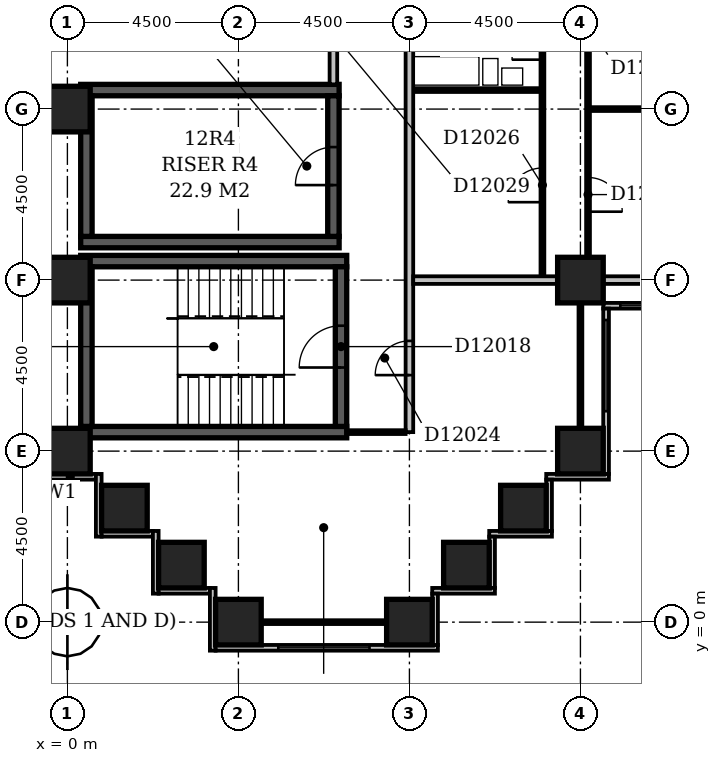
"""IFC4 building model, lengths in metres.
Left out: names, types, materials, properties, quantities, classifications, styles, units other than length and angle.
Written with IfcOpenShell. Run it as: python <this file> out.ifc"""

import sys

from ifc_helpers import new_model, si_unit, direction, frame, frame_2d, origin, origin_2d, place, context, subcontext, project, spatial, rectangle, extrude, element, fill, save


model = new_model("IFC4")
c1 = context("Model", 3, precision=1e-05, world=origin(), true_north=direction((0.0, 1.0)))
c2 = subcontext(c1, "Body", "Model", "MODEL_VIEW")
j1 = project(units=[si_unit("LENGTHUNIT", "METRE"), si_unit("PLANEANGLEUNIT", "RADIAN")], contexts=[c1])
p1 = place(None, origin())
s1 = spatial("IfcSite", under=j1, at=p1, CompositionType="ELEMENT")
p2 = place(p1, origin())
s2 = spatial("IfcBuilding", under=s1, at=p2, CompositionType="ELEMENT")
p3 = place(p2, frame((0.0, 0.0, 54.2)))
s3 = spatial("IfcBuildingStorey", under=s2, at=p3, CompositionType="ELEMENT", Elevation=54.2)
for number, where, z_axis, x_axis in (
    (1, (0.35, 5.0, -0.3), (0.0, 0.0, 1.0), (1.0, 0.0, 0.0)),
    (2, (0.35, 9.5, -0.3), (0.0, 0.0, 1.0), (1.0, 0.0, 0.0)),
):
    element("IfcWall", number, at=place(p3, frame(where, z_axis=z_axis, x_axis=x_axis)), inside=s3, PredefinedType="SHEAR", context=c2, shape_type="SweptSolid", body=[
        extrude(rectangle(XDim=7.0, YDim=0.3, at=frame_2d((3.5, 0.0))), origin(), (0.0, 0.0, 1.0), 3.6),
    ])
for number, where, z_axis, x_axis in (
    (3, (0.35, 10.0, -0.3), (0.0, 0.0, 1.0), (1.0, 0.0, 0.0)),
    (4, (0.35, 14.0, -0.3), (0.0, 0.0, 1.0), (1.0, 0.0, 0.0)),
):
    element("IfcWall", number, at=place(p3, frame(where, z_axis=z_axis, x_axis=x_axis)), inside=s3, PredefinedType="SHEAR", context=c2, shape_type="SweptSolid", body=[
        extrude(rectangle(XDim=6.8, YDim=0.3, at=frame_2d((3.4, 0.0))), origin(), (0.0, 0.0, 1.0), 3.6),
    ])
p4 = place(p3, frame((0.5, 5.15, -0.3), z_axis=(0.0, 0.0, 1.0), x_axis=(0.0, 1.0, 0.0)))
e5 = element("IfcWall", 5, at=p4, inside=s3, PredefinedType="SHEAR", context=c2, shape_type="SweptSolid", body=[
    extrude(rectangle(XDim=4.2, YDim=0.3, at=frame_2d((2.1, 0.0))), origin(), (0.0, 0.0, 1.0), 3.6),
])
p5 = place(p3, frame((0.5, 10.15, -0.3), z_axis=(0.0, 0.0, 1.0), x_axis=(0.0, 1.0, 0.0)))
e6 = element("IfcWall", 6, at=p5, inside=s3, PredefinedType="SHEAR", context=c2, shape_type="SweptSolid", body=[
    extrude(rectangle(XDim=3.7, YDim=0.3, at=frame_2d((1.85, 0.0))), origin(), (0.0, 0.0, 1.0), 3.6),
])
p6 = place(p3, frame((7.0, 10.15, -0.3), z_axis=(0.0, 0.0, 1.0), x_axis=(0.0, 1.0, 0.0)))
e7 = element("IfcWall", 7, at=p6, inside=s3, PredefinedType="SHEAR", context=c2, shape_type="SweptSolid", body=[
    extrude(rectangle(XDim=3.7, YDim=0.3, at=frame_2d((1.85, 0.0))), origin(), (0.0, 0.0, 1.0), 3.6),
])
p7 = place(p6, frame((1.35, 0.0, 0.3)))
e8 = element("IfcOpeningElement", 8, at=p7, cuts=e7, PredefinedType="OPENING", context=c2, shape_type="SweptSolid", body=[
    extrude(rectangle(XDim=1.0, YDim=2.1, at=frame_2d((0.5, 1.05))), frame((0.0, 0.162, 0.0), z_axis=(0.0, -1.0, 0.0), x_axis=(1.0, 0.0, 0.0)), (0.0, 0.0, 1.0), 0.324),
])
p8 = place(p3, frame((7.2, 5.15, -0.3), z_axis=(0.0, 0.0, 1.0), x_axis=(0.0, 1.0, 0.0)))
e9 = element("IfcWall", 9, at=p8, inside=s3, PredefinedType="SHEAR", context=c2, shape_type="SweptSolid", body=[
    extrude(rectangle(XDim=4.2, YDim=0.3, at=frame_2d((2.1, 0.0))), origin(), (0.0, 0.0, 1.0), 3.6),
])
p9 = place(p8, frame((1.55, 0.0, 0.3)))
e10 = element("IfcOpeningElement", 10, at=p9, cuts=e9, PredefinedType="OPENING", context=c2, shape_type="SweptSolid", body=[
    extrude(rectangle(XDim=1.1, YDim=2.1, at=frame_2d((0.55, 1.05))), frame((0.0, 0.162, 0.0), z_axis=(0.0, -1.0, 0.0), x_axis=(1.0, 0.0, 0.0)), (0.0, 0.0, 1.0), 0.324),
])
for number, where, z_axis, x_axis in (
    (11, (4.5, 0.0, -0.3), (0.0, 0.0, 1.0), (1.0, 0.0, 0.0)),
    (12, (9.0, 0.0, -0.3), (0.0, 0.0, 1.0), (1.0, 0.0, 0.0)),
    (13, (3.0, 1.5, -0.3), (0.0, 0.0, 1.0), (1.0, 0.0, 0.0)),
    (14, (10.5, 1.5, -0.3), (0.0, 0.0, 1.0), (1.0, 0.0, 0.0)),
    (15, (1.5, 3.0, -0.3), (0.0, 0.0, 1.0), (1.0, 0.0, 0.0)),
    (16, (12.0, 3.0, -0.3), (0.0, 0.0, 1.0), (1.0, 0.0, 0.0)),
    (17, (0.0, 4.5, -0.3), (0.0, 0.0, 1.0), (1.0, 0.0, 0.0)),
    (18, (13.5, 4.5, -0.3), (0.0, 0.0, 1.0), (1.0, 0.0, 0.0)),
    (19, (0.0, 9.0, -0.3), (0.0, 0.0, 1.0), (1.0, 0.0, 0.0)),
    (20, (13.5, 9.0, -0.3), (0.0, 0.0, 1.0), (1.0, 0.0, 0.0)),
    (21, (0.0, 13.5, -0.3), (0.0, 0.0, 1.0), (1.0, 0.0, 0.0)),
):
    element("IfcColumn", number, at=place(p3, frame(where, z_axis=z_axis, x_axis=x_axis)), inside=s3, PredefinedType="COLUMN", context=c2, shape_type="SweptSolid", body=[
        extrude(rectangle(XDim=1.2, YDim=1.2, at=origin_2d()), origin(), (0.0, 0.0, 1.0), 3.6),
    ])
p10 = place(p3, frame((9.675, -0.6, 0.0), z_axis=(0.0, 0.0, 1.0), x_axis=(0.0, 1.0, 0.0)))
e22 = element("IfcWall", 22, at=p10, inside=s3, PredefinedType="STANDARD", context=c2, shape_type="SweptSolid", body=[
    extrude(rectangle(XDim=1.35, YDim=0.15, at=frame_2d((0.675, 0.0))), origin(), (0.0, 0.0, 1.0), 2.7),
])
p11 = place(p3, frame((9.6, 0.825, 0.0), z_axis=(0.0, 0.0, 1.0), x_axis=(1.0, 0.0, 0.0)))
e23 = element("IfcWall", 23, at=p11, inside=s3, PredefinedType="STANDARD", context=c2, shape_type="SweptSolid", body=[
    extrude(rectangle(XDim=1.65, YDim=0.15, at=frame_2d((0.825, 0.0))), origin(), (0.0, 0.0, 1.0), 2.7),
])
p12 = place(p3, frame((11.175, 0.9, 0.0), z_axis=(0.0, 0.0, 1.0), x_axis=(0.0, 1.0, 0.0)))
e24 = element("IfcWall", 24, at=p12, inside=s3, PredefinedType="STANDARD", context=c2, shape_type="SweptSolid", body=[
    extrude(rectangle(XDim=1.35, YDim=0.15, at=frame_2d((0.675, 0.0))), origin(), (0.0, 0.0, 1.0), 2.7),
])
p13 = place(p3, frame((11.1, 2.325, 0.0), z_axis=(0.0, 0.0, 1.0), x_axis=(1.0, 0.0, 0.0)))
e25 = element("IfcWall", 25, at=p13, inside=s3, PredefinedType="STANDARD", context=c2, shape_type="SweptSolid", body=[
    extrude(rectangle(XDim=1.65, YDim=0.15, at=frame_2d((0.825, 0.0))), origin(), (0.0, 0.0, 1.0), 2.7),
])
p14 = place(p3, frame((12.675, 2.4, 0.0), z_axis=(0.0, 0.0, 1.0), x_axis=(0.0, 1.0, 0.0)))
e26 = element("IfcWall", 26, at=p14, inside=s3, PredefinedType="STANDARD", context=c2, shape_type="SweptSolid", body=[
    extrude(rectangle(XDim=1.35, YDim=0.15, at=frame_2d((0.675, 0.0))), origin(), (0.0, 0.0, 1.0), 2.7),
])
p15 = place(p3, frame((12.6, 3.825, 0.0), z_axis=(0.0, 0.0, 1.0), x_axis=(1.0, 0.0, 0.0)))
e27 = element("IfcWall", 27, at=p15, inside=s3, PredefinedType="STANDARD", context=c2, shape_type="SweptSolid", body=[
    extrude(rectangle(XDim=1.65, YDim=0.15, at=frame_2d((0.825, 0.0))), origin(), (0.0, 0.0, 1.0), 2.7),
])
p16 = place(p3, frame((14.175, 3.9, 0.0), z_axis=(0.0, 0.0, 1.0), x_axis=(0.0, 1.0, 0.0)))
e28 = element("IfcWall", 28, at=p16, inside=s3, PredefinedType="STANDARD", context=c2, shape_type="SweptSolid", body=[
    extrude(rectangle(XDim=4.35, YDim=0.15, at=frame_2d((2.175, 0.0))), origin(), (0.0, 0.0, 1.0), 2.7),
])
p17 = place(p16, frame((1.65, 0.0, 0.6)))
e29 = element("IfcOpeningElement", 29, at=p17, cuts=e28, PredefinedType="OPENING", context=c2, shape_type="SweptSolid", body=[
    extrude(rectangle(XDim=2.4, YDim=1.8, at=frame_2d((1.2, 0.9))), frame((0.0, 0.087, 0.0), z_axis=(0.0, -1.0, 0.0), x_axis=(1.0, 0.0, 0.0)), (0.0, 0.0, 1.0), 0.174),
])
p18 = place(p3, frame((14.1, 8.325, 0.0), z_axis=(0.0, 0.0, 1.0), x_axis=(1.0, 0.0, 0.0)))
e30 = element("IfcWall", 30, at=p18, inside=s3, PredefinedType="STANDARD", context=c2, shape_type="SweptSolid", body=[
    extrude(rectangle(XDim=4.65, YDim=0.15, at=frame_2d((2.325, 0.0))), origin(), (0.0, 0.0, 1.0), 2.7),
])
p19 = place(p18, frame((0.45, 0.0, 0.6)))
e31 = element("IfcOpeningElement", 31, at=p19, cuts=e30, PredefinedType="OPENING", context=c2, shape_type="SweptSolid", body=[
    extrude(rectangle(XDim=2.4, YDim=1.8, at=frame_2d((1.2, 0.9))), frame((0.0, 0.087, 0.0), z_axis=(0.0, -1.0, 0.0), x_axis=(1.0, 0.0, 0.0)), (0.0, 0.0, 1.0), 0.174),
])
p20 = place(p3, frame((-0.6, 3.825, 0.0), z_axis=(0.0, 0.0, 1.0), x_axis=(1.0, 0.0, 0.0)))
e32 = element("IfcWall", 32, at=p20, inside=s3, PredefinedType="STANDARD", context=c2, shape_type="SweptSolid", body=[
    extrude(rectangle(XDim=1.35, YDim=0.15, at=frame_2d((0.675, 0.0))), origin(), (0.0, 0.0, 1.0), 2.7),
])
p21 = place(p3, frame((0.825, 3.9, 0.0), z_axis=(0.0, 0.0, 1.0), x_axis=(0.0, -1.0, 0.0)))
e33 = element("IfcWall", 33, at=p21, inside=s3, PredefinedType="STANDARD", context=c2, shape_type="SweptSolid", body=[
    extrude(rectangle(XDim=1.65, YDim=0.15, at=frame_2d((0.825, 0.0))), origin(), (0.0, 0.0, 1.0), 2.7),
])
p22 = place(p3, frame((0.9, 2.325, 0.0), z_axis=(0.0, 0.0, 1.0), x_axis=(1.0, 0.0, 0.0)))
e34 = element("IfcWall", 34, at=p22, inside=s3, PredefinedType="STANDARD", context=c2, shape_type="SweptSolid", body=[
    extrude(rectangle(XDim=1.35, YDim=0.15, at=frame_2d((0.675, 0.0))), origin(), (0.0, 0.0, 1.0), 2.7),
])
p23 = place(p3, frame((2.325, 2.4, 0.0), z_axis=(0.0, 0.0, 1.0), x_axis=(0.0, -1.0, 0.0)))
e35 = element("IfcWall", 35, at=p23, inside=s3, PredefinedType="STANDARD", context=c2, shape_type="SweptSolid", body=[
    extrude(rectangle(XDim=1.65, YDim=0.15, at=frame_2d((0.825, 0.0))), origin(), (0.0, 0.0, 1.0), 2.7),
])
p24 = place(p3, frame((2.4, 0.825, 0.0), z_axis=(0.0, 0.0, 1.0), x_axis=(1.0, 0.0, 0.0)))
e36 = element("IfcWall", 36, at=p24, inside=s3, PredefinedType="STANDARD", context=c2, shape_type="SweptSolid", body=[
    extrude(rectangle(XDim=1.35, YDim=0.15, at=frame_2d((0.675, 0.0))), origin(), (0.0, 0.0, 1.0), 2.7),
])
p25 = place(p3, frame((3.825, 0.9, 0.0), z_axis=(0.0, 0.0, 1.0), x_axis=(0.0, -1.0, 0.0)))
e37 = element("IfcWall", 37, at=p25, inside=s3, PredefinedType="STANDARD", context=c2, shape_type="SweptSolid", body=[
    extrude(rectangle(XDim=1.65, YDim=0.15, at=frame_2d((0.825, 0.0))), origin(), (0.0, 0.0, 1.0), 2.7),
])
p26 = place(p3, frame((3.9, -0.675, 0.0), z_axis=(0.0, 0.0, 1.0), x_axis=(1.0, 0.0, 0.0)))
e38 = element("IfcWall", 38, at=p26, inside=s3, PredefinedType="STANDARD", context=c2, shape_type="SweptSolid", body=[
    extrude(rectangle(XDim=5.85, YDim=0.15, at=frame_2d((2.925, 0.0))), origin(), (0.0, 0.0, 1.0), 2.7),
])
p27 = place(p26, frame((1.65, 0.0, 0.6)))
e39 = element("IfcOpeningElement", 39, at=p27, cuts=e38, PredefinedType="OPENING", context=c2, shape_type="SweptSolid", body=[
    extrude(rectangle(XDim=2.4, YDim=1.8, at=frame_2d((1.2, 0.9))), frame((0.0, 0.087, 0.0), z_axis=(0.0, -1.0, 0.0), x_axis=(1.0, 0.0, 0.0)), (0.0, 0.0, 1.0), 0.174),
])
p28 = place(p3, frame((5.1, 0.0, 0.0), z_axis=(0.0, 0.0, 1.0), x_axis=(1.0, 0.0, 0.0)))
e40 = element("IfcWall", 40, at=p28, inside=s3, PredefinedType="PARTITIONING", context=c2, shape_type="SweptSolid", body=[
    extrude(rectangle(XDim=3.3, YDim=0.1, at=frame_2d((1.65, 0.0))), origin(), (0.0, 0.0, 1.0), 2.7),
])
p29 = place(p3, frame((0.0, 4.4, 0.0), z_axis=(0.0, 0.0, 1.0), x_axis=(0.0, 1.0, 0.0)))
e41 = element("IfcWall", 41, at=p29, inside=s3, PredefinedType="PARTITIONING", context=c2, shape_type="SweptSolid", body=[
    extrude(rectangle(XDim=0.7, YDim=0.1, at=frame_2d((0.35, 0.0))), origin(), (0.0, 0.0, 1.0), 2.7),
])
p30 = place(p3, frame((7.349, 5.0, 0.0), z_axis=(0.0, 0.0, 1.0), x_axis=(1.0, 0.0, 0.0)))
e42 = element("IfcWall", 42, at=p30, inside=s3, PredefinedType="PARTITIONING", context=c2, shape_type="SweptSolid", body=[
    extrude(rectangle(XDim=1.551, YDim=0.1, at=frame_2d((0.775, 0.0))), origin(), (0.0, 0.0, 1.0), 3.3),
])
p31 = place(p3, frame((9.0, 5.0, 0.0), z_axis=(0.0, 0.0, 1.0), x_axis=(0.0, 1.0, 0.0)))
e43 = element("IfcWall", 43, at=p31, inside=s3, PredefinedType="PARTITIONING", context=c2, shape_type="SweptSolid", body=[
    extrude(rectangle(XDim=44.5, YDim=0.2, at=frame_2d((22.25, 0.0))), origin(), (0.0, 0.0, 1.0), 3.3),
])
p32 = place(p31, frame((28.45, 0.0, 0.0)))
e44 = element("IfcOpeningElement", 44, at=p32, cuts=e43, PredefinedType="OPENING", context=c2, shape_type="SweptSolid", body=[
    extrude(rectangle(XDim=1.0, YDim=2.1, at=frame_2d((0.5, 1.05))), frame((0.0, 0.112, 0.0), z_axis=(0.0, -1.0, 0.0), x_axis=(1.0, 0.0, 0.0)), (0.0, 0.0, 1.0), 0.224),
])
p33 = place(p31, frame((17.8, 0.0, 0.0)))
e45 = element("IfcOpeningElement", 45, at=p33, cuts=e43, PredefinedType="OPENING", context=c2, shape_type="SweptSolid", body=[
    extrude(rectangle(XDim=1.0, YDim=2.1, at=frame_2d((0.5, 1.05))), frame((0.0, 0.112, 0.0), z_axis=(0.0, -1.0, 0.0), x_axis=(1.0, 0.0, 0.0)), (0.0, 0.0, 1.0), 0.224),
])
p34 = place(p31, frame((14.55, 0.0, 0.0)))
e46 = element("IfcOpeningElement", 46, at=p34, cuts=e43, PredefinedType="OPENING", context=c2, shape_type="SweptSolid", body=[
    extrude(rectangle(XDim=1.0, YDim=2.1, at=frame_2d((0.5, 1.05))), frame((0.0, 0.112, 0.0), z_axis=(0.0, -1.0, 0.0), x_axis=(1.0, 0.0, 0.0)), (0.0, 0.0, 1.0), 0.224),
])
p35 = place(p31, frame((11.7, 0.0, 0.0)))
e47 = element("IfcOpeningElement", 47, at=p35, cuts=e43, PredefinedType="OPENING", context=c2, shape_type="SweptSolid", body=[
    extrude(rectangle(XDim=1.0, YDim=2.1, at=frame_2d((0.5, 1.05))), frame((0.0, 0.112, 0.0), z_axis=(0.0, -1.0, 0.0), x_axis=(1.0, 0.0, 0.0)), (0.0, 0.0, 1.0), 0.224),
])
p36 = place(p31, frame((35.0, 0.0, 0.0)))
e48 = element("IfcOpeningElement", 48, at=p36, cuts=e43, PredefinedType="OPENING", context=c2, shape_type="SweptSolid", body=[
    extrude(rectangle(XDim=0.9, YDim=2.1, at=frame_2d((0.45, 1.05))), frame((0.0, 0.112, 0.0), z_axis=(0.0, -1.0, 0.0), x_axis=(1.0, 0.0, 0.0)), (0.0, 0.0, 1.0), 0.224),
])
p37 = place(p31, frame((1.5, 0.0, 0.0)))
e49 = element("IfcOpeningElement", 49, at=p37, cuts=e43, PredefinedType="OPENING", context=c2, shape_type="SweptSolid", body=[
    extrude(rectangle(XDim=0.9, YDim=2.1, at=frame_2d((0.45, 1.05))), frame((0.0, 0.112, 0.0), z_axis=(0.0, -1.0, 0.0), x_axis=(1.0, 0.0, 0.0)), (0.0, 0.0, 1.0), 0.224),
])
p38 = place(p3, frame((13.5, 5.1, 0.0), z_axis=(0.0, 0.0, 1.0), x_axis=(0.0, 1.0, 0.0)))
e50 = element("IfcWall", 50, at=p38, inside=s3, PredefinedType="PARTITIONING", context=c2, shape_type="SweptSolid", body=[
    extrude(rectangle(XDim=3.3, YDim=0.1, at=frame_2d((1.65, 0.0))), origin(), (0.0, 0.0, 1.0), 2.7),
])
p39 = place(p3, frame((9.1, 9.0, 0.0), z_axis=(0.0, 0.0, 1.0), x_axis=(1.0, 0.0, 0.0)))
e51 = element("IfcWall", 51, at=p39, inside=s3, PredefinedType="PARTITIONING", context=c2, shape_type="SweptSolid", body=[
    extrude(rectangle(XDim=3.8, YDim=0.2, at=frame_2d((1.9, 0.0))), origin(), (0.0, 0.0, 1.0), 3.3),
])
p40 = place(p3, frame((14.1, 9.0, 0.0), z_axis=(0.0, 0.0, 1.0), x_axis=(1.0, 0.0, 0.0)))
e52 = element("IfcWall", 52, at=p40, inside=s3, PredefinedType="PARTITIONING", context=c2, shape_type="SweptSolid", body=[
    extrude(rectangle(XDim=3.3, YDim=0.2, at=frame_2d((1.65, 0.0))), origin(), (0.0, 0.0, 1.0), 2.7),
])
p41 = place(p3, frame((12.5, 9.1, 0.0), z_axis=(0.0, 0.0, 1.0), x_axis=(0.0, 1.0, 0.0)))
e53 = element("IfcWall", 53, at=p41, inside=s3, PredefinedType="PARTITIONING", context=c2, shape_type="SweptSolid", body=[
    extrude(rectangle(XDim=7.3, YDim=0.1, at=frame_2d((3.65, 0.0))), origin(), (0.0, 0.0, 1.0), 3.3),
])
p42 = place(p41, frame((5.7, 0.0, 0.0)))
e54 = element("IfcOpeningElement", 54, at=p42, cuts=e53, PredefinedType="OPENING", context=c2, shape_type="SweptSolid", body=[
    extrude(rectangle(XDim=0.8, YDim=2.1, at=frame_2d((0.4, 1.05))), frame((0.0, 0.062, 0.0), z_axis=(0.0, -1.0, 0.0), x_axis=(1.0, 0.0, 0.0)), (0.0, 0.0, 1.0), 0.124),
])
p43 = place(p41, frame((1.95, 0.0, 0.0)))
e55 = element("IfcOpeningElement", 55, at=p43, cuts=e53, PredefinedType="OPENING", context=c2, shape_type="SweptSolid", body=[
    extrude(rectangle(XDim=0.9, YDim=2.1, at=frame_2d((0.45, 1.05))), frame((0.0, 0.062, 0.0), z_axis=(0.0, -1.0, 0.0), x_axis=(1.0, 0.0, 0.0)), (0.0, 0.0, 1.0), 0.124),
])
p44 = place(p3, frame((13.7, 9.6, 0.0), z_axis=(0.0, 0.0, 1.0), x_axis=(0.0, 1.0, 0.0)))
e56 = element("IfcWall", 56, at=p44, inside=s3, PredefinedType="PARTITIONING", context=c2, shape_type="SweptSolid", body=[
    extrude(rectangle(XDim=8.3, YDim=0.1, at=frame_2d((4.15, 0.0))), origin(), (0.0, 0.0, 1.0), 3.3),
])
p45 = place(p44, frame((1.2, 0.0, 0.0)))
e57 = element("IfcOpeningElement", 57, at=p45, cuts=e56, PredefinedType="OPENING", context=c2, shape_type="SweptSolid", body=[
    extrude(rectangle(XDim=0.9, YDim=2.1, at=frame_2d((0.45, 1.05))), frame((0.0, 0.062, 0.0), z_axis=(0.0, -1.0, 0.0), x_axis=(1.0, 0.0, 0.0)), (0.0, 0.0, 1.0), 0.124),
])
p46 = place(p44, frame((5.7, 0.0, 0.0)))
e58 = element("IfcOpeningElement", 58, at=p46, cuts=e56, PredefinedType="OPENING", context=c2, shape_type="SweptSolid", body=[
    extrude(rectangle(XDim=0.9, YDim=2.1, at=frame_2d((0.45, 1.05))), frame((0.0, 0.062, 0.0), z_axis=(0.0, -1.0, 0.0), x_axis=(1.0, 0.0, 0.0)), (0.0, 0.0, 1.0), 0.124),
])
p47 = place(p3, frame((13.75, 13.5, 0.0), z_axis=(0.0, 0.0, 1.0), x_axis=(1.0, 0.0, 0.0)))
e59 = element("IfcWall", 59, at=p47, inside=s3, PredefinedType="PARTITIONING", context=c2, shape_type="SweptSolid", body=[
    extrude(rectangle(XDim=3.65, YDim=0.1, at=frame_2d((1.825, 0.0))), origin(), (0.0, 0.0, 1.0), 3.3),
])
p48 = place(p3, frame((9.1, 14.0, 0.0), z_axis=(0.0, 0.0, 1.0), x_axis=(1.0, 0.0, 0.0)))
e60 = element("IfcWall", 60, at=p48, inside=s3, PredefinedType="PLUMBINGWALL", context=c2, shape_type="SweptSolid", body=[
    extrude(rectangle(XDim=3.35, YDim=0.1, at=frame_2d((1.675, 0.0))), origin(), (0.0, 0.0, 1.0), 3.3),
])
p49 = place(p3, frame((7.0, 14.15, 0.0), z_axis=(0.0, 0.0, 1.0), x_axis=(0.0, 1.0, 0.0)))
e61 = element("IfcWall", 61, at=p49, inside=s3, PredefinedType="PARTITIONING", context=c2, shape_type="SweptSolid", body=[
    extrude(rectangle(XDim=4.2, YDim=0.2, at=frame_2d((2.1, 0.0))), origin(), (0.0, 0.0, 1.0), 3.3),
])
p50 = place(p49, frame((1.65, 0.0, 0.0)))
e62 = element("IfcOpeningElement", 62, at=p50, cuts=e61, PredefinedType="OPENING", context=c2, shape_type="SweptSolid", body=[
    extrude(rectangle(XDim=0.9, YDim=2.1, at=frame_2d((0.45, 1.05))), frame((0.0, 0.112, 0.0), z_axis=(0.0, -1.0, 0.0), x_axis=(1.0, 0.0, 0.0)), (0.0, 0.0, 1.0), 0.224),
])
p51 = place(p17, origin())
e63 = element("IfcWindow", 63, at=p51, inside=s3, PartitioningType="SINGLE_PANEL", PredefinedType="WINDOW", context=c2, shape_type="SweptSolid", body=[
    extrude(rectangle(XDim=2.4, YDim=1.8, at=frame_2d((1.2, 0.9))), frame((0.0, 0.03, 0.0), z_axis=(0.0, -1.0, 0.0), x_axis=(1.0, 0.0, 0.0)), (0.0, 0.0, 1.0), 0.06),
])
fill(e29, e63)
p52 = place(p19, origin())
e64 = element("IfcWindow", 64, at=p52, inside=s3, PartitioningType="SINGLE_PANEL", PredefinedType="WINDOW", context=c2, shape_type="SweptSolid", body=[
    extrude(rectangle(XDim=2.4, YDim=1.8, at=frame_2d((1.2, 0.9))), frame((0.0, 0.03, 0.0), z_axis=(0.0, -1.0, 0.0), x_axis=(1.0, 0.0, 0.0)), (0.0, 0.0, 1.0), 0.06),
])
fill(e31, e64)
p53 = place(p27, origin())
e65 = element("IfcWindow", 65, at=p53, inside=s3, PartitioningType="SINGLE_PANEL", PredefinedType="WINDOW", context=c2, shape_type="SweptSolid", body=[
    extrude(rectangle(XDim=2.4, YDim=1.8, at=frame_2d((1.2, 0.9))), frame((0.0, 0.03, 0.0), z_axis=(0.0, -1.0, 0.0), x_axis=(1.0, 0.0, 0.0)), (0.0, 0.0, 1.0), 0.06),
])
fill(e39, e65)
p54 = place(p7, origin())
e66 = element("IfcDoor", 66, at=p54, inside=s3, OperationType="SINGLE_SWING_LEFT", PredefinedType="DOOR", context=c2, shape_type="SweptSolid", body=[
    extrude(rectangle(XDim=1.0, YDim=2.1, at=frame_2d((0.5, 1.05))), frame((0.0, 0.025, 0.0), z_axis=(0.0, -1.0, 0.0), x_axis=(1.0, 0.0, 0.0)), (0.0, 0.0, 1.0), 0.05),
])
fill(e8, e66)
p55 = place(p9, origin())
e67 = element("IfcDoor", 67, at=p55, inside=s3, OperationType="SINGLE_SWING_LEFT", PredefinedType="DOOR", context=c2, shape_type="SweptSolid", body=[
    extrude(rectangle(XDim=1.1, YDim=2.1, at=frame_2d((0.55, 1.05))), frame((0.0, 0.025, 0.0), z_axis=(0.0, -1.0, 0.0), x_axis=(1.0, 0.0, 0.0)), (0.0, 0.0, 1.0), 0.05),
])
fill(e10, e67)
p56 = place(p37, origin())
e68 = element("IfcDoor", 68, at=p56, inside=s3, OperationType="SINGLE_SWING_LEFT", PredefinedType="DOOR", context=c2, shape_type="SweptSolid", body=[
    extrude(rectangle(XDim=0.9, YDim=2.1, at=frame_2d((0.45, 1.05))), frame((0.0, 0.025, 0.0), z_axis=(0.0, -1.0, 0.0), x_axis=(1.0, 0.0, 0.0)), (0.0, 0.0, 1.0), 0.05),
])
fill(e49, e68)
p57 = place(p42, origin())
e69 = element("IfcDoor", 69, at=p57, inside=s3, OperationType="SINGLE_SWING_LEFT", PredefinedType="DOOR", context=c2, shape_type="SweptSolid", body=[
    extrude(rectangle(XDim=0.8, YDim=2.1, at=frame_2d((0.4, 1.05))), frame((0.0, 0.025, 0.0), z_axis=(0.0, -1.0, 0.0), x_axis=(1.0, 0.0, 0.0)), (0.0, 0.0, 1.0), 0.05),
])
fill(e54, e69)
p58 = place(p43, origin())
e70 = element("IfcDoor", 70, at=p58, inside=s3, OperationType="SINGLE_SWING_LEFT", PredefinedType="DOOR", context=c2, shape_type="SweptSolid", body=[
    extrude(rectangle(XDim=0.9, YDim=2.1, at=frame_2d((0.45, 1.05))), frame((0.0, 0.025, 0.0), z_axis=(0.0, -1.0, 0.0), x_axis=(1.0, 0.0, 0.0)), (0.0, 0.0, 1.0), 0.05),
])
fill(e55, e70)
p59 = place(p45, frame((0.9, 0.0, 0.0), z_axis=(0.0, 0.0, 1.0), x_axis=(-1.0, 0.0, 0.0)))
e71 = element("IfcDoor", 71, at=p59, inside=s3, OperationType="SINGLE_SWING_RIGHT", PredefinedType="DOOR", context=c2, shape_type="SweptSolid", body=[
    extrude(rectangle(XDim=0.9, YDim=2.1, at=frame_2d((0.45, 1.05))), frame((0.0, 0.025, 0.0), z_axis=(0.0, -1.0, 0.0), x_axis=(1.0, 0.0, 0.0)), (0.0, 0.0, 1.0), 0.05),
])
fill(e57, e71)
save(model, sys.argv[1])
